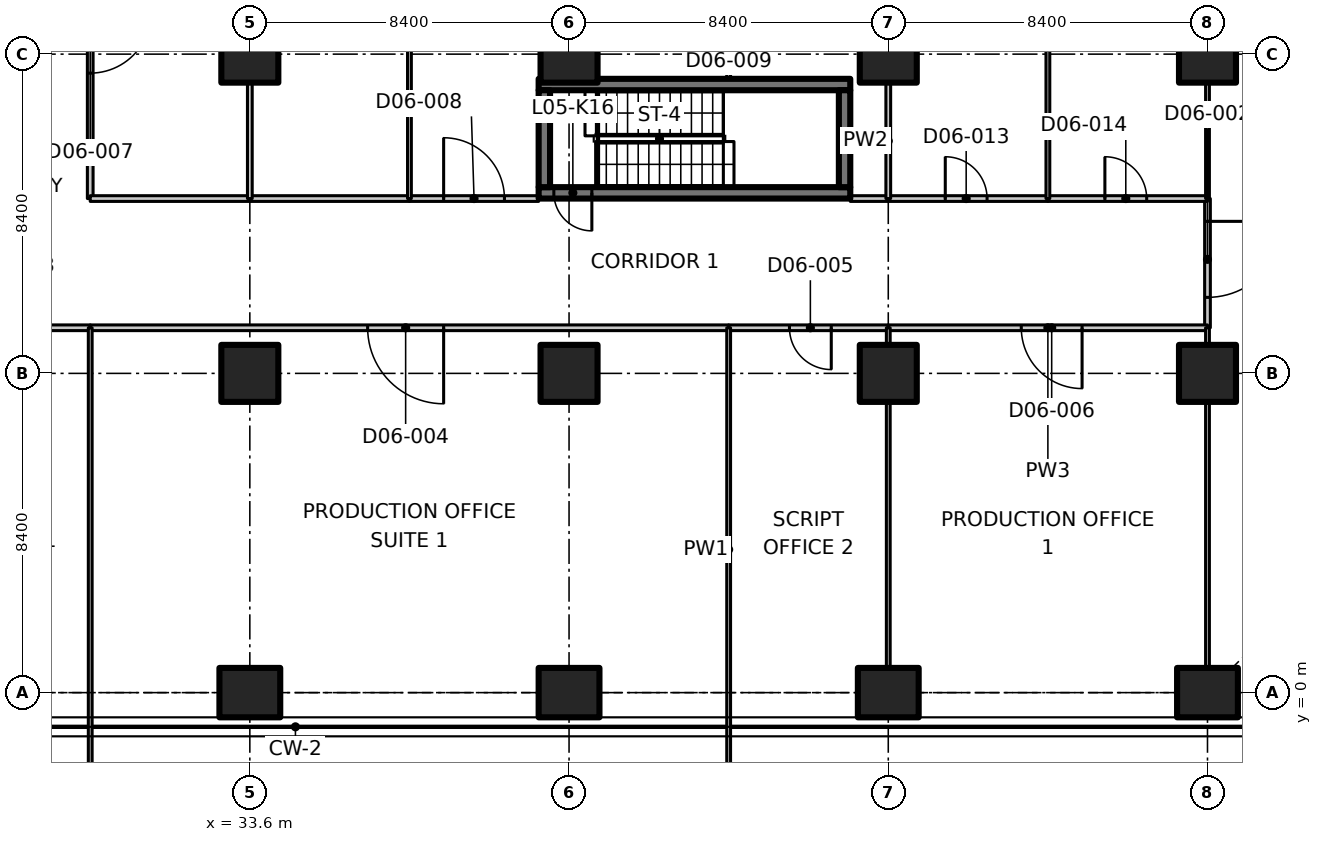
"""IFC4 building model, lengths in metres.
Left out: names, types, materials, properties, quantities, classifications, styles, units other than length and angle.
Written with IfcOpenShell. Run it as: python <this file> out.ifc"""

import sys

from ifc_helpers import new_model, si_unit, direction, frame, frame_2d, origin, origin_2d, place, context, subcontext, project, spatial, polyline, rectangle, outline, extrude, element, fill, save


model = new_model("IFC4")
c1 = context("Model", 3, precision=1e-05, world=origin(), true_north=direction((0.0, 1.0)))
c2 = subcontext(c1, "Body", "Model", "MODEL_VIEW")
j1 = project(units=[si_unit("LENGTHUNIT", "METRE"), si_unit("PLANEANGLEUNIT", "RADIAN")], contexts=[c1])
p1 = place(None, origin())
s1 = spatial("IfcSite", under=j1, at=p1, CompositionType="ELEMENT")
p2 = place(p1, origin())
s2 = spatial("IfcBuilding", under=s1, at=p2, CompositionType="ELEMENT")
p3 = place(p2, frame((0.0, 0.0, 32.0)))
s3 = spatial("IfcBuildingStorey", under=s2, at=p3, CompositionType="ELEMENT", Elevation=32.0)
p4 = place(p3, frame((33.6, 0.0, 0.0), z_axis=(0.0, 0.0, 1.0), x_axis=(0.0, 1.0, 0.0)))
e1 = element("IfcColumn", 1, at=p4, inside=s3, PredefinedType="COLUMN", context=c2, shape_type="SweptSolid", body=[
    extrude(rectangle(XDim=1.3, YDim=1.6, at=origin_2d()), origin(), (0.0, 0.0, 1.0), 4.25),
])
for number, where, z_axis, x_axis in (
    (2, (33.6, 8.4, 0.0), (0.0, 0.0, 1.0), (1.0, 0.0, 0.0)),
    (3, (33.6, 16.8, 0.0), (0.0, 0.0, 1.0), (1.0, 0.0, 0.0)),
):
    element("IfcColumn", number, at=place(p3, frame(where, z_axis=z_axis, x_axis=x_axis)), inside=s3, PredefinedType="COLUMN", context=c2, shape_type="SweptSolid", body=[
        extrude(rectangle(XDim=1.5, YDim=1.5, at=origin_2d()), origin(), (0.0, 0.0, 1.0), 4.25),
    ])
p5 = place(p3, frame((42.0, 0.0, 0.0), z_axis=(0.0, 0.0, 1.0), x_axis=(0.0, 1.0, 0.0)))
e4 = element("IfcColumn", 4, at=p5, inside=s3, PredefinedType="COLUMN", context=c2, shape_type="SweptSolid", body=[
    extrude(rectangle(XDim=1.3, YDim=1.6, at=origin_2d()), origin(), (0.0, 0.0, 1.0), 4.25),
])
for number, where, z_axis, x_axis in (
    (5, (42.0, 8.4, 0.0), (0.0, 0.0, 1.0), (1.0, 0.0, 0.0)),
    (6, (42.0, 16.8, 0.0), (0.0, 0.0, 1.0), (1.0, 0.0, 0.0)),
):
    element("IfcColumn", number, at=place(p3, frame(where, z_axis=z_axis, x_axis=x_axis)), inside=s3, PredefinedType="COLUMN", context=c2, shape_type="SweptSolid", body=[
        extrude(rectangle(XDim=1.5, YDim=1.5, at=origin_2d()), origin(), (0.0, 0.0, 1.0), 4.25),
    ])
p6 = place(p3, frame((50.4, 0.0, 0.0), z_axis=(0.0, 0.0, 1.0), x_axis=(0.0, 1.0, 0.0)))
e7 = element("IfcColumn", 7, at=p6, inside=s3, PredefinedType="COLUMN", context=c2, shape_type="SweptSolid", body=[
    extrude(rectangle(XDim=1.3, YDim=1.6, at=origin_2d()), origin(), (0.0, 0.0, 1.0), 4.25),
])
for number, where, z_axis, x_axis in (
    (8, (50.4, 8.4, 0.0), (0.0, 0.0, 1.0), (1.0, 0.0, 0.0)),
    (9, (50.4, 16.8, 0.0), (0.0, 0.0, 1.0), (1.0, 0.0, 0.0)),
):
    element("IfcColumn", number, at=place(p3, frame(where, z_axis=z_axis, x_axis=x_axis)), inside=s3, PredefinedType="COLUMN", context=c2, shape_type="SweptSolid", body=[
        extrude(rectangle(XDim=1.5, YDim=1.5, at=origin_2d()), origin(), (0.0, 0.0, 1.0), 4.25),
    ])
p7 = place(p3, frame((58.8, 0.0, 0.0), z_axis=(0.0, 0.0, 1.0), x_axis=(0.0, 1.0, 0.0)))
e10 = element("IfcColumn", 10, at=p7, inside=s3, PredefinedType="COLUMN", context=c2, shape_type="SweptSolid", body=[
    extrude(rectangle(XDim=1.3, YDim=1.6, at=origin_2d()), origin(), (0.0, 0.0, 1.0), 4.25),
])
for number, where, z_axis, x_axis in (
    (11, (58.8, 8.4, 0.0), (0.0, 0.0, 1.0), (1.0, 0.0, 0.0)),
    (12, (58.8, 16.8, 0.0), (0.0, 0.0, 1.0), (1.0, 0.0, 0.0)),
):
    element("IfcColumn", number, at=place(p3, frame(where, z_axis=z_axis, x_axis=x_axis)), inside=s3, PredefinedType="COLUMN", context=c2, shape_type="SweptSolid", body=[
        extrude(rectangle(XDim=1.5, YDim=1.5, at=origin_2d()), origin(), (0.0, 0.0, 1.0), 4.25),
    ])
p8 = place(p3, frame((49.4, 13.15, 0.0), z_axis=(0.0, 0.0, 1.0), x_axis=(-1.0, 0.0, 0.0)))
e13 = element("IfcWall", 13, at=p8, inside=s3, PredefinedType="SHEAR", context=c2, shape_type="SweptSolid", body=[
    extrude(rectangle(XDim=8.2, YDim=0.3, at=frame_2d((4.1, 0.0))), origin(), (0.0, 0.0, 1.0), 4.25),
])
p9 = place(p8, frame((6.8, 0.0, 0.0)))
e14 = element("IfcOpeningElement", 14, at=p9, cuts=e13, PredefinedType="OPENING", context=c2, shape_type="SweptSolid", body=[
    extrude(rectangle(XDim=1.0, YDim=2.1, at=frame_2d((0.5, 1.05))), frame((0.0, 0.16, 0.0), z_axis=(0.0, -1.0, 0.0), x_axis=(1.0, 0.0, 0.0)), (0.0, 0.0, 1.0), 0.32),
])
p10 = place(p3, frame((41.2, 16.0, 0.0), z_axis=(0.0, 0.0, 1.0), x_axis=(1.0, 0.0, 0.0)))
e15 = element("IfcWall", 15, at=p10, inside=s3, PredefinedType="SHEAR", context=c2, shape_type="SweptSolid", body=[
    extrude(rectangle(XDim=8.2, YDim=0.3, at=frame_2d((4.1, 0.0))), origin(), (0.0, 0.0, 1.0), 4.25),
])
for number, where, z_axis, x_axis in (
    (16, (41.35, 13.3, 0.0), (0.0, 0.0, 1.0), (0.0, 1.0, 0.0)),
    (17, (49.25, 13.3, 0.0), (0.0, 0.0, 1.0), (0.0, 1.0, 0.0)),
):
    element("IfcWall", number, at=place(p3, frame(where, z_axis=z_axis, x_axis=x_axis)), inside=s3, PredefinedType="SHEAR", context=c2, shape_type="SweptSolid", body=[
        extrude(rectangle(XDim=2.55, YDim=0.3, at=frame_2d((1.275, 0.0))), origin(), (0.0, 0.0, 1.0), 4.25),
    ])
p11 = place(p3, frame((29.4, 9.6, 0.0), z_axis=(0.0, 0.0, 1.0), x_axis=(-1.0, 0.0, 0.0)))
e18 = element("IfcWall", 18, at=p11, inside=s3, PredefinedType="PARTITIONING", context=c2, shape_type="SweptSolid", body=[
    extrude(rectangle(XDim=4.2, YDim=0.15, at=frame_2d((2.1, 0.0))), origin(), (0.0, 0.0, 1.0), 4.23),
])
p12 = place(p11, frame((1.5, 0.0, 0.0)))
e19 = element("IfcOpeningElement", 19, at=p12, cuts=e18, PredefinedType="OPENING", context=c2, shape_type="SweptSolid", body=[
    extrude(rectangle(XDim=1.1, YDim=2.1, at=frame_2d((0.55, 1.05))), frame((0.0, 0.085, 0.0), z_axis=(0.0, -1.0, 0.0), x_axis=(1.0, 0.0, 0.0)), (0.0, 0.0, 1.0), 0.17),
])
p13 = place(p3, frame((29.4, 21.2, 0.0), z_axis=(0.0, 0.0, 1.0), x_axis=(0.0, -1.0, 0.0)))
e20 = element("IfcWall", 20, at=p13, inside=s3, PredefinedType="PARTITIONING", context=c2, shape_type="SweptSolid", body=[
    extrude(rectangle(XDim=8.2, YDim=0.15, at=frame_2d((4.1, 0.0))), origin(), (0.0, 0.0, 1.0), 4.23),
])
p14 = place(p13, frame((3.3, 0.0, 0.0)))
e21 = element("IfcOpeningElement", 21, at=p14, cuts=e20, PredefinedType="OPENING", context=c2, shape_type="SweptSolid", body=[
    extrude(rectangle(XDim=1.6, YDim=2.1, at=frame_2d((0.8, 1.05))), frame((0.0, 0.085, 0.0), z_axis=(0.0, -1.0, 0.0), x_axis=(1.0, 0.0, 0.0)), (0.0, 0.0, 1.0), 0.17),
])
p15 = place(p3, frame((58.8, 13.0, 0.0), z_axis=(0.0, 0.0, 1.0), x_axis=(0.0, -1.0, 0.0)))
e22 = element("IfcWall", 22, at=p15, inside=s3, PredefinedType="PARTITIONING", context=c2, shape_type="SweptSolid", body=[
    extrude(rectangle(XDim=3.4, YDim=0.15, at=frame_2d((1.7, 0.0))), origin(), (0.0, 0.0, 1.0), 4.23),
])
p16 = place(p15, frame((0.6, 0.0, 0.0)))
e23 = element("IfcOpeningElement", 23, at=p16, cuts=e22, PredefinedType="OPENING", context=c2, shape_type="SweptSolid", body=[
    extrude(rectangle(XDim=2.0, YDim=2.4, at=frame_2d((1.0, 1.2))), frame((0.0, 0.085, 0.0), z_axis=(0.0, -1.0, 0.0), x_axis=(1.0, 0.0, 0.0)), (0.0, 0.0, 1.0), 0.17),
])
p17 = place(p3, frame((46.2, 9.6, 0.0), z_axis=(0.0, 0.0, 1.0), x_axis=(-1.0, 0.0, 0.0)))
e24 = element("IfcWall", 24, at=p17, inside=s3, PredefinedType="PARTITIONING", context=c2, shape_type="SweptSolid", body=[
    extrude(rectangle(XDim=16.8, YDim=0.15, at=frame_2d((8.4, 0.0))), origin(), (0.0, 0.0, 1.0), 4.23),
])
p18 = place(p17, frame((7.5, 0.0, 0.0)))
e25 = element("IfcOpeningElement", 25, at=p18, cuts=e24, PredefinedType="OPENING", context=c2, shape_type="SweptSolid", body=[
    extrude(rectangle(XDim=2.0, YDim=2.4, at=frame_2d((1.0, 1.2))), frame((0.0, 0.085, 0.0), z_axis=(0.0, -1.0, 0.0), x_axis=(1.0, 0.0, 0.0)), (0.0, 0.0, 1.0), 0.17),
])
p19 = place(p3, frame((50.4, 9.6, 0.0), z_axis=(0.0, 0.0, 1.0), x_axis=(-1.0, 0.0, 0.0)))
e26 = element("IfcWall", 26, at=p19, inside=s3, PredefinedType="PARTITIONING", context=c2, shape_type="SweptSolid", body=[
    extrude(rectangle(XDim=4.2, YDim=0.15, at=frame_2d((2.1, 0.0))), origin(), (0.0, 0.0, 1.0), 4.23),
])
p20 = place(p19, frame((1.5, 0.0, 0.0)))
e27 = element("IfcOpeningElement", 27, at=p20, cuts=e26, PredefinedType="OPENING", context=c2, shape_type="SweptSolid", body=[
    extrude(rectangle(XDim=1.1, YDim=2.1, at=frame_2d((0.55, 1.05))), frame((0.0, 0.085, 0.0), z_axis=(0.0, -1.0, 0.0), x_axis=(1.0, 0.0, 0.0)), (0.0, 0.0, 1.0), 0.17),
])
p21 = place(p3, frame((58.8, 9.6, 0.0), z_axis=(0.0, 0.0, 1.0), x_axis=(-1.0, 0.0, 0.0)))
e28 = element("IfcWall", 28, at=p21, inside=s3, PredefinedType="PARTITIONING", context=c2, shape_type="SweptSolid", body=[
    extrude(rectangle(XDim=8.4, YDim=0.15, at=frame_2d((4.2, 0.0))), origin(), (0.0, 0.0, 1.0), 4.23),
])
p22 = place(p21, frame((3.3, 0.0, 0.0)))
e29 = element("IfcOpeningElement", 29, at=p22, cuts=e28, PredefinedType="OPENING", context=c2, shape_type="SweptSolid", body=[
    extrude(rectangle(XDim=1.6, YDim=2.1, at=frame_2d((0.8, 1.05))), frame((0.0, 0.085, 0.0), z_axis=(0.0, -1.0, 0.0), x_axis=(1.0, 0.0, 0.0)), (0.0, 0.0, 1.0), 0.17),
])
p23 = place(p3, frame((29.4, 13.0, 0.0), z_axis=(0.0, 0.0, 1.0), x_axis=(1.0, 0.0, 0.0)))
e30 = element("IfcWall", 30, at=p23, inside=s3, PredefinedType="PARTITIONING", context=c2, shape_type="SweptSolid", body=[
    extrude(rectangle(XDim=4.2, YDim=0.15, at=frame_2d((2.1, 0.0))), origin(), (0.0, 0.0, 1.0), 4.23),
])
p24 = place(p3, frame((37.8, 13.0, 0.0), z_axis=(0.0, 0.0, 1.0), x_axis=(1.0, 0.0, 0.0)))
e31 = element("IfcWall", 31, at=p24, inside=s3, PredefinedType="PARTITIONING", context=c2, shape_type="SweptSolid", body=[
    extrude(rectangle(XDim=3.4, YDim=0.15, at=frame_2d((1.7, 0.0))), origin(), (0.0, 0.0, 1.0), 4.23),
])
p25 = place(p24, frame((0.9, 0.0, 0.0)))
e32 = element("IfcOpeningElement", 32, at=p25, cuts=e31, PredefinedType="OPENING", context=c2, shape_type="SweptSolid", body=[
    extrude(rectangle(XDim=1.6, YDim=2.1, at=frame_2d((0.8, 1.05))), frame((0.0, 0.085, 0.0), z_axis=(0.0, -1.0, 0.0), x_axis=(1.0, 0.0, 0.0)), (0.0, 0.0, 1.0), 0.17),
])
p26 = place(p3, frame((49.4, 13.0, 0.0), z_axis=(0.0, 0.0, 1.0), x_axis=(1.0, 0.0, 0.0)))
e33 = element("IfcWall", 33, at=p26, inside=s3, PredefinedType="PARTITIONING", context=c2, shape_type="SweptSolid", body=[
    extrude(rectangle(XDim=1.0, YDim=0.15, at=frame_2d((0.5, 0.0))), origin(), (0.0, 0.0, 1.0), 4.23),
])
p27 = place(p3, frame((33.6, 13.0, 0.0), z_axis=(0.0, 0.0, 1.0), x_axis=(1.0, 0.0, 0.0)))
e34 = element("IfcWall", 34, at=p27, inside=s3, PredefinedType="PARTITIONING", context=c2, shape_type="SweptSolid", body=[
    extrude(rectangle(XDim=4.2, YDim=0.15, at=frame_2d((2.1, 0.0))), origin(), (0.0, 0.0, 1.0), 4.23),
])
p28 = place(p3, frame((50.4, 13.0, 0.0), z_axis=(0.0, 0.0, 1.0), x_axis=(1.0, 0.0, 0.0)))
e35 = element("IfcWall", 35, at=p28, inside=s3, PredefinedType="PARTITIONING", context=c2, shape_type="SweptSolid", body=[
    extrude(rectangle(XDim=4.2, YDim=0.15, at=frame_2d((2.1, 0.0))), origin(), (0.0, 0.0, 1.0), 4.23),
])
p29 = place(p28, frame((1.5, 0.0, 0.0)))
e36 = element("IfcOpeningElement", 36, at=p29, cuts=e35, PredefinedType="OPENING", context=c2, shape_type="SweptSolid", body=[
    extrude(rectangle(XDim=1.1, YDim=2.1, at=frame_2d((0.55, 1.05))), frame((0.0, 0.085, 0.0), z_axis=(0.0, -1.0, 0.0), x_axis=(1.0, 0.0, 0.0)), (0.0, 0.0, 1.0), 0.17),
])
p30 = place(p3, frame((54.6, 13.0, 0.0), z_axis=(0.0, 0.0, 1.0), x_axis=(1.0, 0.0, 0.0)))
e37 = element("IfcWall", 37, at=p30, inside=s3, PredefinedType="PARTITIONING", context=c2, shape_type="SweptSolid", body=[
    extrude(rectangle(XDim=4.2, YDim=0.15, at=frame_2d((2.1, 0.0))), origin(), (0.0, 0.0, 1.0), 4.23),
])
p31 = place(p30, frame((1.5, 0.0, 0.0)))
e38 = element("IfcOpeningElement", 38, at=p31, cuts=e37, PredefinedType="OPENING", context=c2, shape_type="SweptSolid", body=[
    extrude(rectangle(XDim=1.1, YDim=2.1, at=frame_2d((0.55, 1.05))), frame((0.0, 0.085, 0.0), z_axis=(0.0, -1.0, 0.0), x_axis=(1.0, 0.0, 0.0)), (0.0, 0.0, 1.0), 0.17),
])
p32 = place(p3, frame((58.8, 0.67, 0.0), z_axis=(0.0, 0.0, 1.0), x_axis=(0.0, 1.0, 0.0)))
e39 = element("IfcWall", 39, at=p32, inside=s3, PredefinedType="PARTITIONING", context=c2, shape_type="SweptSolid", body=[
    extrude(rectangle(XDim=6.96, YDim=0.1, at=frame_2d((3.48, 0.0))), origin(), (0.0, 0.0, 1.0), 4.23),
])
p33 = place(p3, frame((58.8, 9.17, 0.0), z_axis=(0.0, 0.0, 1.0), x_axis=(0.0, 1.0, 0.0)))
e40 = element("IfcWall", 40, at=p33, inside=s3, PredefinedType="PARTITIONING", context=c2, shape_type="SweptSolid", body=[
    extrude(rectangle(XDim=0.43, YDim=0.1, at=frame_2d((0.215, 0.0))), origin(), (0.0, 0.0, 1.0), 4.23),
])
p34 = place(p3, frame((58.8, 13.0, 0.0), z_axis=(0.0, 0.0, 1.0), x_axis=(0.0, 1.0, 0.0)))
e41 = element("IfcWall", 41, at=p34, inside=s3, PredefinedType="PARTITIONING", context=c2, shape_type="SweptSolid", body=[
    extrude(rectangle(XDim=3.03, YDim=0.1, at=frame_2d((1.515, 0.0))), origin(), (0.0, 0.0, 1.0), 4.23),
])
for number, where, z_axis, x_axis in (
    (42, (29.4, 9.6, 0.0), (0.0, 0.0, 1.0), (0.0, -1.0, 0.0)),
    (43, (46.2, 9.6, 0.0), (0.0, 0.0, 1.0), (0.0, -1.0, 0.0)),
):
    element("IfcWall", number, at=place(p3, frame(where, z_axis=z_axis, x_axis=x_axis)), inside=s3, PredefinedType="PARTITIONING", context=c2, shape_type="SweptSolid", body=[
        extrude(outline(polyline([(0.0, 0.0), (11.67, 0.0), (11.67, 4.23), (10.7, 4.23), (10.05, 4.23), (10.048, 3.88), (9.152, 3.88), (9.15, 4.23), (0.0, 4.23), (0.0, 0.0)])), frame((0.0, 0.05, 0.0), z_axis=(0.0, -1.0, 0.0), x_axis=(1.0, 0.0, 0.0)), (0.0, 0.0, 1.0), 0.1),
    ])
p35 = place(p3, frame((50.4, 9.6, 0.0), z_axis=(0.0, 0.0, 1.0), x_axis=(0.0, -1.0, 0.0)))
e44 = element("IfcWall", 44, at=p35, inside=s3, PredefinedType="PARTITIONING", context=c2, shape_type="SweptSolid", body=[
    extrude(rectangle(XDim=0.43, YDim=0.1, at=frame_2d((0.215, 0.0))), origin(), (0.0, 0.0, 1.0), 4.23),
])
p36 = place(p3, frame((50.4, 7.63, 0.0), z_axis=(0.0, 0.0, 1.0), x_axis=(0.0, -1.0, 0.0)))
e45 = element("IfcWall", 45, at=p36, inside=s3, PredefinedType="PARTITIONING", context=c2, shape_type="SweptSolid", body=[
    extrude(rectangle(XDim=6.96, YDim=0.1, at=frame_2d((3.48, 0.0))), origin(), (0.0, 0.0, 1.0), 4.23),
])
p37 = place(p3, frame((33.6, 16.03, 0.0), z_axis=(0.0, 0.0, 1.0), x_axis=(0.0, -1.0, 0.0)))
e46 = element("IfcWall", 46, at=p37, inside=s3, PredefinedType="PARTITIONING", context=c2, shape_type="SweptSolid", body=[
    extrude(rectangle(XDim=3.03, YDim=0.125, at=frame_2d((1.515, 0.0))), origin(), (0.0, 0.0, 1.0), 4.23),
])
p38 = place(p3, frame((46.2, 21.4, 0.0), z_axis=(0.0, 0.0, 1.0), x_axis=(0.0, -1.0, 0.0)))
e47 = element("IfcWall", 47, at=p38, inside=s3, PredefinedType="PARTITIONING", context=c2, shape_type="SweptSolid", body=[
    extrude(rectangle(XDim=5.25, YDim=0.1, at=frame_2d((2.625, 0.0))), origin(), (0.0, 0.0, 1.0), 4.23),
])
p39 = place(p38, frame((2.1, 0.0, 0.0)))
e48 = element("IfcOpeningElement", 48, at=p39, cuts=e47, PredefinedType="OPENING", context=c2, shape_type="SweptSolid", body=[
    extrude(rectangle(XDim=1.0, YDim=2.1, at=frame_2d((0.5, 1.05))), frame((0.0, 0.06, 0.0), z_axis=(0.0, -1.0, 0.0), x_axis=(1.0, 0.0, 0.0)), (0.0, 0.0, 1.0), 0.12),
])
p40 = place(p3, frame((37.8, 13.0, 0.0), z_axis=(0.0, 0.0, 1.0), x_axis=(0.0, 1.0, 0.0)))
e49 = element("IfcWall", 49, at=p40, inside=s3, PredefinedType="PARTITIONING", context=c2, shape_type="SweptSolid", body=[
    extrude(outline(polyline([(0.0, 0.0), (12.0, 0.0), (12.0, 3.88), (11.752, 3.88), (11.75, 4.23), (0.0, 4.23), (0.0, 0.0)])), frame((0.0, 0.05, 0.0), z_axis=(0.0, -1.0, 0.0), x_axis=(1.0, 0.0, 0.0)), (0.0, 0.0, 1.0), 0.1),
])
p41 = place(p40, frame((5.4, 0.0, 0.0)))
e50 = element("IfcOpeningElement", 50, at=p41, cuts=e49, PredefinedType="OPENING", context=c2, shape_type="SweptSolid", body=[
    extrude(rectangle(XDim=1.2, YDim=2.1, at=frame_2d((0.6, 1.05))), frame((0.0, 0.06, 0.0), z_axis=(0.0, -1.0, 0.0), x_axis=(1.0, 0.0, 0.0)), (0.0, 0.0, 1.0), 0.12),
])
p42 = place(p3, frame((50.4, 16.03, 0.0), z_axis=(0.0, 0.0, 1.0), x_axis=(0.0, -1.0, 0.0)))
e51 = element("IfcWall", 51, at=p42, inside=s3, PredefinedType="PARTITIONING", context=c2, shape_type="SweptSolid", body=[
    extrude(rectangle(XDim=3.03, YDim=0.125, at=frame_2d((1.515, 0.0))), origin(), (0.0, 0.0, 1.0), 4.23),
])
p43 = place(p3, frame((54.6, 27.27, 0.0), z_axis=(0.0, 0.0, 1.0), x_axis=(0.0, -1.0, 0.0)))
e52 = element("IfcWall", 52, at=p43, inside=s3, PredefinedType="PARTITIONING", context=c2, shape_type="SweptSolid", body=[
    extrude(outline(polyline([(0.0, 0.0), (14.27, 0.0), (14.27, 4.23), (2.52, 4.23), (2.518, 3.88), (1.622, 3.88), (1.62, 4.23), (0.97, 4.23), (0.0, 4.23), (0.0, 0.0)])), frame((0.0, 0.05, 0.0), z_axis=(0.0, -1.0, 0.0), x_axis=(1.0, 0.0, 0.0)), (0.0, 0.0, 1.0), 0.1),
])
p44 = place(p9, origin())
e53 = element("IfcDoor", 53, at=p44, inside=s3, OperationType="SINGLE_SWING_LEFT", PredefinedType="DOOR", context=c2, shape_type="SweptSolid", body=[
    extrude(rectangle(XDim=1.0, YDim=2.1, at=frame_2d((0.5, 1.05))), frame((0.0, 0.025, 0.0), z_axis=(0.0, -1.0, 0.0), x_axis=(1.0, 0.0, 0.0)), (0.0, 0.0, 1.0), 0.05),
])
fill(e14, e53)
p45 = place(p16, origin())
e54 = element("IfcDoor", 54, at=p45, inside=s3, OperationType="DOUBLE_DOOR_SINGLE_SWING", PredefinedType="DOOR", context=c2, shape_type="SweptSolid", body=[
    extrude(rectangle(XDim=2.0, YDim=2.4, at=frame_2d((1.0, 1.2))), frame((0.0, 0.025, 0.0), z_axis=(0.0, -1.0, 0.0), x_axis=(1.0, 0.0, 0.0)), (0.0, 0.0, 1.0), 0.05),
])
fill(e23, e54)
p46 = place(p18, origin())
e55 = element("IfcDoor", 55, at=p46, inside=s3, OperationType="DOUBLE_DOOR_SINGLE_SWING", PredefinedType="DOOR", context=c2, shape_type="SweptSolid", body=[
    extrude(rectangle(XDim=2.0, YDim=2.4, at=frame_2d((1.0, 1.2))), frame((0.0, 0.025, 0.0), z_axis=(0.0, -1.0, 0.0), x_axis=(1.0, 0.0, 0.0)), (0.0, 0.0, 1.0), 0.05),
])
fill(e25, e55)
p47 = place(p20, origin())
e56 = element("IfcDoor", 56, at=p47, inside=s3, OperationType="SINGLE_SWING_LEFT", PredefinedType="DOOR", context=c2, shape_type="SweptSolid", body=[
    extrude(rectangle(XDim=1.1, YDim=2.1, at=frame_2d((0.55, 1.05))), frame((0.0, 0.025, 0.0), z_axis=(0.0, -1.0, 0.0), x_axis=(1.0, 0.0, 0.0)), (0.0, 0.0, 1.0), 0.05),
])
fill(e27, e56)
p48 = place(p22, origin())
e57 = element("IfcDoor", 57, at=p48, inside=s3, OperationType="DOUBLE_DOOR_SINGLE_SWING", PredefinedType="DOOR", context=c2, shape_type="SweptSolid", body=[
    extrude(rectangle(XDim=1.6, YDim=2.1, at=frame_2d((0.8, 1.05))), frame((0.0, 0.025, 0.0), z_axis=(0.0, -1.0, 0.0), x_axis=(1.0, 0.0, 0.0)), (0.0, 0.0, 1.0), 0.05),
])
fill(e29, e57)
p49 = place(p14, origin())
e58 = element("IfcDoor", 58, at=p49, inside=s3, OperationType="DOUBLE_DOOR_SINGLE_SWING", PredefinedType="DOOR", context=c2, shape_type="SweptSolid", body=[
    extrude(rectangle(XDim=1.6, YDim=2.1, at=frame_2d((0.8, 1.05))), frame((0.0, 0.025, 0.0), z_axis=(0.0, -1.0, 0.0), x_axis=(1.0, 0.0, 0.0)), (0.0, 0.0, 1.0), 0.05),
])
fill(e21, e58)
p50 = place(p25, origin())
e59 = element("IfcDoor", 59, at=p50, inside=s3, OperationType="DOUBLE_DOOR_SINGLE_SWING", PredefinedType="DOOR", context=c2, shape_type="SweptSolid", body=[
    extrude(rectangle(XDim=1.6, YDim=2.1, at=frame_2d((0.8, 1.05))), frame((0.0, 0.025, 0.0), z_axis=(0.0, -1.0, 0.0), x_axis=(1.0, 0.0, 0.0)), (0.0, 0.0, 1.0), 0.05),
])
fill(e32, e59)
p51 = place(p29, origin())
e60 = element("IfcDoor", 60, at=p51, inside=s3, OperationType="SINGLE_SWING_LEFT", PredefinedType="DOOR", context=c2, shape_type="SweptSolid", body=[
    extrude(rectangle(XDim=1.1, YDim=2.1, at=frame_2d((0.55, 1.05))), frame((0.0, 0.025, 0.0), z_axis=(0.0, -1.0, 0.0), x_axis=(1.0, 0.0, 0.0)), (0.0, 0.0, 1.0), 0.05),
])
fill(e36, e60)
p52 = place(p31, origin())
e61 = element("IfcDoor", 61, at=p52, inside=s3, OperationType="SINGLE_SWING_LEFT", PredefinedType="DOOR", context=c2, shape_type="SweptSolid", body=[
    extrude(rectangle(XDim=1.1, YDim=2.1, at=frame_2d((0.55, 1.05))), frame((0.0, 0.025, 0.0), z_axis=(0.0, -1.0, 0.0), x_axis=(1.0, 0.0, 0.0)), (0.0, 0.0, 1.0), 0.05),
])
fill(e38, e61)
save(model, sys.argv[1])
